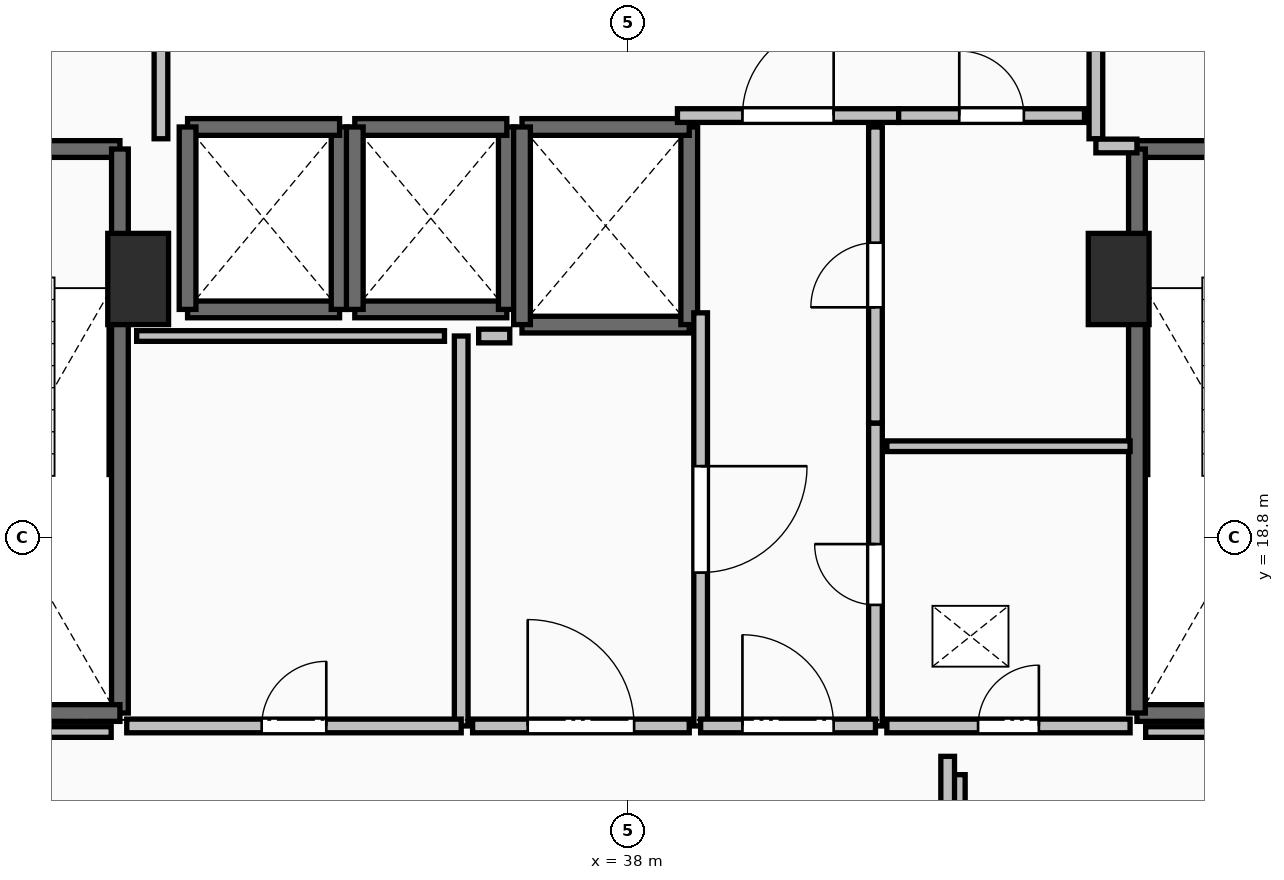
"""IFC4 building model, lengths in metres.
Left out: names, types, materials, properties, quantities, classifications, styles, units other than length and angle.
Written with IfcOpenShell. Run it as: python <this file> out.ifc"""

import sys

from ifc_helpers import new_model, si_unit, direction, frame, frame_2d, origin, origin_2d, place, context, subcontext, project, spatial, rectangle, extrude, element, fill, save


model = new_model("IFC4")
c1 = context("Model", 3, precision=1e-05, world=origin(), true_north=direction((0.0, 1.0)))
c2 = subcontext(c1, "Body", "Model", "MODEL_VIEW")
j1 = project(units=[si_unit("LENGTHUNIT", "METRE"), si_unit("PLANEANGLEUNIT", "RADIAN")], contexts=[c1])
p1 = place(None, origin())
s1 = spatial("IfcSite", under=j1, at=p1, CompositionType="ELEMENT")
p2 = place(p1, origin())
s2 = spatial("IfcBuilding", under=s1, at=p2, CompositionType="ELEMENT")
p3 = place(p2, frame((0.0, 0.0, 48.5)))
s3 = spatial("IfcBuildingStorey", under=s2, at=p3, CompositionType="ELEMENT", Elevation=48.5)
for number, where, z_axis, x_axis in (
    (1, (31.55, 22.2, 0.0), (0.0, 0.0, 1.0), (1.0, 0.0, 0.0)),
    (2, (44.45, 22.2, 0.0), (0.0, 0.0, 1.0), (1.0, 0.0, 0.0)),
):
    element("IfcColumn", number, at=place(p3, frame(where, z_axis=z_axis, x_axis=x_axis)), inside=s3, PredefinedType="PILASTER", context=c2, shape_type="SweptSolid", body=[
        extrude(rectangle(XDim=0.8, YDim=1.2, at=origin_2d()), origin(), (0.0, 0.0, 1.0), 3.5),
    ])
p4 = place(p3, frame((27.94, 23.91, 0.0), z_axis=(0.0, 0.0, 1.0), x_axis=(1.0, 0.0, 0.0)))
e3 = element("IfcWall", 3, at=p4, inside=s3, PredefinedType="SOLIDWALL", context=c2, shape_type="SweptSolid", body=[
    extrude(rectangle(XDim=3.37, YDim=0.22, at=frame_2d((1.685, 0.0))), origin(), (0.0, 0.0, 1.0), 3.24),
])
p5 = place(p4, frame((1.135, 0.0, 0.0)))
e4 = element("IfcOpeningElement", 4, at=p5, cuts=e3, PredefinedType="OPENING", context=c2, shape_type="SweptSolid", body=[
    extrude(rectangle(XDim=1.1, YDim=2.15, at=frame_2d((0.55, 1.075))), frame((0.0, 0.125, 0.0), z_axis=(0.0, -1.0, 0.0), x_axis=(1.0, 0.0, 0.0)), (0.0, 0.0, 1.0), 0.25),
])
p6 = place(p3, frame((31.31, 23.91, 0.0), z_axis=(0.0, 0.0, 1.0), x_axis=(0.0, -1.0, 0.0)))
e5 = element("IfcWall", 5, at=p6, inside=s3, PredefinedType="SOLIDWALL", context=c2, shape_type="SweptSolid", body=[
    extrude(rectangle(XDim=7.42, YDim=0.22, at=frame_2d((3.71, 0.0))), origin(), (0.0, 0.0, 1.0), 3.24),
])
p7 = place(p3, frame((31.31, 16.49, 0.0), z_axis=(0.0, 0.0, 1.0), x_axis=(-1.0, 0.0, 0.0)))
e6 = element("IfcWall", 6, at=p7, inside=s3, PredefinedType="SOLIDWALL", context=c2, shape_type="SweptSolid", body=[
    extrude(rectangle(XDim=3.37, YDim=0.22, at=frame_2d((1.685, 0.0))), origin(), (0.0, 0.0, 1.0), 3.24),
])
p8 = place(p3, frame((44.69, 23.91, 0.0), z_axis=(0.0, 0.0, 1.0), x_axis=(1.0, 0.0, 0.0)))
e7 = element("IfcWall", 7, at=p8, inside=s3, PredefinedType="SOLIDWALL", context=c2, shape_type="SweptSolid", body=[
    extrude(rectangle(XDim=3.37, YDim=0.22, at=frame_2d((1.685, 0.0))), origin(), (0.0, 0.0, 1.0), 3.24),
])
p9 = place(p8, frame((1.135, 0.0, 0.0)))
e8 = element("IfcOpeningElement", 8, at=p9, cuts=e7, PredefinedType="OPENING", context=c2, shape_type="SweptSolid", body=[
    extrude(rectangle(XDim=1.1, YDim=2.15, at=frame_2d((0.55, 1.075))), frame((0.0, 0.125, 0.0), z_axis=(0.0, -1.0, 0.0), x_axis=(1.0, 0.0, 0.0)), (0.0, 0.0, 1.0), 0.25),
])
p10 = place(p3, frame((48.06, 16.49, 0.0), z_axis=(0.0, 0.0, 1.0), x_axis=(-1.0, 0.0, 0.0)))
e9 = element("IfcWall", 9, at=p10, inside=s3, PredefinedType="SOLIDWALL", context=c2, shape_type="SweptSolid", body=[
    extrude(rectangle(XDim=3.37, YDim=0.22, at=frame_2d((1.685, 0.0))), origin(), (0.0, 0.0, 1.0), 3.24),
])
p11 = place(p3, frame((44.69, 16.49, 0.0), z_axis=(0.0, 0.0, 1.0), x_axis=(0.0, 1.0, 0.0)))
e10 = element("IfcWall", 10, at=p11, inside=s3, PredefinedType="SOLIDWALL", context=c2, shape_type="SweptSolid", body=[
    extrude(rectangle(XDim=7.42, YDim=0.22, at=frame_2d((3.71, 0.0))), origin(), (0.0, 0.0, 1.0), 3.24),
])
p12 = place(p3, frame((32.2, 21.8, 0.0), z_axis=(0.0, 0.0, 1.0), x_axis=(1.0, 0.0, 0.0)))
e11 = element("IfcWall", 11, at=p12, inside=s3, PredefinedType="SOLIDWALL", context=c2, shape_type="SweptSolid", body=[
    extrude(rectangle(XDim=2.0, YDim=0.22, at=frame_2d((1.0, 0.0))), origin(), (0.0, 0.0, 1.0), 3.24),
])
p13 = place(p3, frame((34.2, 21.8, 0.0), z_axis=(0.0, 0.0, 1.0), x_axis=(0.0, 1.0, 0.0)))
e12 = element("IfcWall", 12, at=p13, inside=s3, PredefinedType="SOLIDWALL", context=c2, shape_type="SweptSolid", body=[
    extrude(rectangle(XDim=2.4, YDim=0.22, at=frame_2d((1.2, 0.0))), origin(), (0.0, 0.0, 1.0), 3.24),
])
p14 = place(p3, frame((34.2, 24.2, 0.0), z_axis=(0.0, 0.0, 1.0), x_axis=(-1.0, 0.0, 0.0)))
e13 = element("IfcWall", 13, at=p14, inside=s3, PredefinedType="SOLIDWALL", context=c2, shape_type="SweptSolid", body=[
    extrude(rectangle(XDim=2.0, YDim=0.22, at=frame_2d((1.0, 0.0))), origin(), (0.0, 0.0, 1.0), 3.24),
])
p15 = place(p3, frame((32.2, 24.2, 0.0), z_axis=(0.0, 0.0, 1.0), x_axis=(0.0, -1.0, 0.0)))
e14 = element("IfcWall", 14, at=p15, inside=s3, PredefinedType="SOLIDWALL", context=c2, shape_type="SweptSolid", body=[
    extrude(rectangle(XDim=2.4, YDim=0.22, at=frame_2d((1.2, 0.0))), origin(), (0.0, 0.0, 1.0), 3.24),
])
p16 = place(p3, frame((34.4, 21.8, 0.0), z_axis=(0.0, 0.0, 1.0), x_axis=(1.0, 0.0, 0.0)))
e15 = element("IfcWall", 15, at=p16, inside=s3, PredefinedType="SOLIDWALL", context=c2, shape_type="SweptSolid", body=[
    extrude(rectangle(XDim=2.0, YDim=0.22, at=frame_2d((1.0, 0.0))), origin(), (0.0, 0.0, 1.0), 3.24),
])
p17 = place(p3, frame((36.4, 21.8, 0.0), z_axis=(0.0, 0.0, 1.0), x_axis=(0.0, 1.0, 0.0)))
e16 = element("IfcWall", 16, at=p17, inside=s3, PredefinedType="SOLIDWALL", context=c2, shape_type="SweptSolid", body=[
    extrude(rectangle(XDim=2.4, YDim=0.22, at=frame_2d((1.2, 0.0))), origin(), (0.0, 0.0, 1.0), 3.24),
])
p18 = place(p3, frame((36.4, 24.2, 0.0), z_axis=(0.0, 0.0, 1.0), x_axis=(-1.0, 0.0, 0.0)))
e17 = element("IfcWall", 17, at=p18, inside=s3, PredefinedType="SOLIDWALL", context=c2, shape_type="SweptSolid", body=[
    extrude(rectangle(XDim=2.0, YDim=0.22, at=frame_2d((1.0, 0.0))), origin(), (0.0, 0.0, 1.0), 3.24),
])
p19 = place(p3, frame((34.4, 24.2, 0.0), z_axis=(0.0, 0.0, 1.0), x_axis=(0.0, -1.0, 0.0)))
e18 = element("IfcWall", 18, at=p19, inside=s3, PredefinedType="SOLIDWALL", context=c2, shape_type="SweptSolid", body=[
    extrude(rectangle(XDim=2.4, YDim=0.22, at=frame_2d((1.2, 0.0))), origin(), (0.0, 0.0, 1.0), 3.24),
])
p20 = place(p3, frame((36.6, 21.6, 0.0), z_axis=(0.0, 0.0, 1.0), x_axis=(1.0, 0.0, 0.0)))
e19 = element("IfcWall", 19, at=p20, inside=s3, PredefinedType="SOLIDWALL", context=c2, shape_type="SweptSolid", body=[
    extrude(rectangle(XDim=2.2, YDim=0.22, at=frame_2d((1.1, 0.0))), origin(), (0.0, 0.0, 1.0), 3.24),
])
p21 = place(p3, frame((38.8, 21.6, 0.0), z_axis=(0.0, 0.0, 1.0), x_axis=(0.0, 1.0, 0.0)))
e20 = element("IfcWall", 20, at=p21, inside=s3, PredefinedType="SOLIDWALL", context=c2, shape_type="SweptSolid", body=[
    extrude(rectangle(XDim=2.6, YDim=0.22, at=frame_2d((1.3, 0.0))), origin(), (0.0, 0.0, 1.0), 3.24),
])
p22 = place(p3, frame((38.8, 24.2, 0.0), z_axis=(0.0, 0.0, 1.0), x_axis=(-1.0, 0.0, 0.0)))
e21 = element("IfcWall", 21, at=p22, inside=s3, PredefinedType="SOLIDWALL", context=c2, shape_type="SweptSolid", body=[
    extrude(rectangle(XDim=2.2, YDim=0.22, at=frame_2d((1.1, 0.0))), origin(), (0.0, 0.0, 1.0), 3.24),
])
p23 = place(p3, frame((36.6, 24.2, 0.0), z_axis=(0.0, 0.0, 1.0), x_axis=(0.0, -1.0, 0.0)))
e22 = element("IfcWall", 22, at=p23, inside=s3, PredefinedType="SOLIDWALL", context=c2, shape_type="SweptSolid", body=[
    extrude(rectangle(XDim=2.6, YDim=0.22, at=frame_2d((1.3, 0.0))), origin(), (0.0, 0.0, 1.0), 3.24),
])
p24 = place(p3, frame((31.85, 24.045, 0.0), z_axis=(0.0, 0.0, 1.0), x_axis=(0.0, 1.0, 0.0)))
e23 = element("IfcWall", 23, at=p24, inside=s3, PredefinedType="PARTITIONING", context=c2, shape_type="SweptSolid", body=[
    extrude(rectangle(XDim=3.91, YDim=0.18, at=frame_2d((1.955, 0.0))), origin(), (0.0, 0.0, 1.0), 3.24),
])
p25 = place(p24, frame((1.355, 0.0, 0.0)))
e24 = element("IfcOpeningElement", 24, at=p25, cuts=e23, PredefinedType="OPENING", context=c2, shape_type="SweptSolid", body=[
    extrude(rectangle(XDim=1.2, YDim=2.15, at=frame_2d((0.6, 1.075))), frame((0.0, 0.105, 0.0), z_axis=(0.0, -1.0, 0.0), x_axis=(1.0, 0.0, 0.0)), (0.0, 0.0, 1.0), 0.21),
])
p26 = place(p3, frame((44.15, 27.955, 0.0), z_axis=(0.0, 0.0, 1.0), x_axis=(0.0, -1.0, 0.0)))
e25 = element("IfcWall", 25, at=p26, inside=s3, PredefinedType="PARTITIONING", context=c2, shape_type="SweptSolid", body=[
    extrude(rectangle(XDim=3.91, YDim=0.18, at=frame_2d((1.955, 0.0))), origin(), (0.0, 0.0, 1.0), 3.24),
])
p27 = place(p26, frame((1.355, 0.0, 0.0)))
e26 = element("IfcOpeningElement", 26, at=p27, cuts=e25, PredefinedType="OPENING", context=c2, shape_type="SweptSolid", body=[
    extrude(rectangle(XDim=1.2, YDim=2.15, at=frame_2d((0.6, 1.075))), frame((0.0, 0.105, 0.0), z_axis=(0.0, -1.0, 0.0), x_axis=(1.0, 0.0, 0.0)), (0.0, 0.0, 1.0), 0.21),
])
p28 = place(p3, frame((44.15, 23.95, 0.0), z_axis=(0.0, 0.0, 1.0), x_axis=(1.0, 0.0, 0.0)))
e27 = element("IfcWall", 27, at=p28, inside=s3, PredefinedType="PARTITIONING", context=c2, shape_type="SweptSolid", body=[
    extrude(rectangle(XDim=0.54, YDim=0.18, at=frame_2d((0.27, 0.0))), origin(), (0.0, 0.0, 1.0), 3.24),
])
p29 = place(p3, frame((38.645, 24.35, 0.0), z_axis=(0.0, 0.0, 1.0), x_axis=(1.0, 0.0, 0.0)))
e28 = element("IfcWall", 28, at=p29, inside=s3, PredefinedType="PARTITIONING", context=c2, shape_type="SweptSolid", body=[
    extrude(rectangle(XDim=2.91, YDim=0.18, at=frame_2d((1.455, 0.0))), origin(), (0.0, 0.0, 1.0), 3.24),
])
p30 = place(p29, frame((0.855, 0.0, 0.0)))
e29 = element("IfcOpeningElement", 29, at=p30, cuts=e28, PredefinedType="OPENING", context=c2, shape_type="SweptSolid", body=[
    extrude(rectangle(XDim=1.2, YDim=2.15, at=frame_2d((0.6, 1.075))), frame((0.0, 0.105, 0.0), z_axis=(0.0, -1.0, 0.0), x_axis=(1.0, 0.0, 0.0)), (0.0, 0.0, 1.0), 0.21),
])
p31 = place(p3, frame((41.555, 24.35, 0.0), z_axis=(0.0, 0.0, 1.0), x_axis=(1.0, 0.0, 0.0)))
e30 = element("IfcWall", 30, at=p31, inside=s3, PredefinedType="PARTITIONING", context=c2, shape_type="SweptSolid", body=[
    extrude(rectangle(XDim=2.445, YDim=0.18, at=frame_2d((1.223, 0.0))), origin(), (0.0, 0.0, 1.0), 3.24),
])
p32 = place(p31, frame((0.798, 0.0, 0.0)))
e31 = element("IfcOpeningElement", 31, at=p32, cuts=e30, PredefinedType="OPENING", context=c2, shape_type="SweptSolid", body=[
    extrude(rectangle(XDim=0.85, YDim=2.1, at=frame_2d((0.425, 1.05))), frame((0.0, 0.105, 0.0), z_axis=(0.0, -1.0, 0.0), x_axis=(1.0, 0.0, 0.0)), (0.0, 0.0, 1.0), 0.21),
])
p33 = place(p3, frame((41.25, 16.32, 0.0), z_axis=(0.0, 0.0, 1.0), x_axis=(0.0, 1.0, 0.0)))
e32 = element("IfcWall", 32, at=p33, inside=s3, PredefinedType="PARTITIONING", context=c2, shape_type="SweptSolid", body=[
    extrude(rectangle(XDim=3.985, YDim=0.18, at=frame_2d((1.992, 0.0))), origin(), (0.0, 0.0, 1.0), 3.24),
])
p34 = place(p33, frame((1.593, 0.0, 0.0)))
e33 = element("IfcOpeningElement", 33, at=p34, cuts=e32, PredefinedType="OPENING", context=c2, shape_type="SweptSolid", body=[
    extrude(rectangle(XDim=0.8, YDim=2.05, at=frame_2d((0.4, 1.025))), frame((0.0, 0.105, 0.0), z_axis=(0.0, -1.0, 0.0), x_axis=(1.0, 0.0, 0.0)), (0.0, 0.0, 1.0), 0.21),
])
p35 = place(p3, frame((41.25, 20.305, 0.0), z_axis=(0.0, 0.0, 1.0), x_axis=(0.0, 1.0, 0.0)))
e34 = element("IfcWall", 34, at=p35, inside=s3, PredefinedType="PARTITIONING", context=c2, shape_type="SweptSolid", body=[
    extrude(rectangle(XDim=3.895, YDim=0.18, at=frame_2d((1.948, 0.0))), origin(), (0.0, 0.0, 1.0), 3.24),
])
p36 = place(p35, frame((1.522, 0.0, 0.0)))
e35 = element("IfcOpeningElement", 35, at=p36, cuts=e34, PredefinedType="OPENING", context=c2, shape_type="SweptSolid", body=[
    extrude(rectangle(XDim=0.85, YDim=2.1, at=frame_2d((0.425, 1.05))), frame((0.0, 0.105, 0.0), z_axis=(0.0, -1.0, 0.0), x_axis=(1.0, 0.0, 0.0)), (0.0, 0.0, 1.0), 0.21),
])
p37 = place(p3, frame((38.95, 21.755, 0.0), z_axis=(0.0, 0.0, 1.0), x_axis=(0.0, -1.0, 0.0)))
e36 = element("IfcWall", 36, at=p37, inside=s3, PredefinedType="PARTITIONING", context=c2, shape_type="SweptSolid", body=[
    extrude(rectangle(XDim=5.435, YDim=0.18, at=frame_2d((2.717, 0.0))), origin(), (0.0, 0.0, 1.0), 3.24),
])
p38 = place(p37, frame((2.018, 0.0, 0.0)))
e37 = element("IfcOpeningElement", 37, at=p38, cuts=e36, PredefinedType="OPENING", context=c2, shape_type="SweptSolid", body=[
    extrude(rectangle(XDim=1.4, YDim=2.2, at=frame_2d((0.7, 1.1))), frame((0.0, 0.105, 0.0), z_axis=(0.0, -1.0, 0.0), x_axis=(1.0, 0.0, 0.0)), (0.0, 0.0, 1.0), 0.21),
])
p39 = place(p3, frame((38.95, 16.32, 0.0), z_axis=(0.0, 0.0, 1.0), x_axis=(1.0, 0.0, 0.0)))
e38 = element("IfcWall", 38, at=p39, inside=s3, PredefinedType="PARTITIONING", context=c2, shape_type="SweptSolid", body=[
    extrude(rectangle(XDim=2.3, YDim=0.18, at=frame_2d((1.15, 0.0))), origin(), (0.0, 0.0, 1.0), 3.24),
])
p40 = place(p39, frame((0.55, 0.0, 0.0)))
e39 = element("IfcOpeningElement", 39, at=p40, cuts=e38, PredefinedType="OPENING", context=c2, shape_type="SweptSolid", body=[
    extrude(rectangle(XDim=1.2, YDim=2.15, at=frame_2d((0.6, 1.075))), frame((0.0, 0.105, 0.0), z_axis=(0.0, -1.0, 0.0), x_axis=(1.0, 0.0, 0.0)), (0.0, 0.0, 1.0), 0.21),
])
p41 = place(p3, frame((44.6, 20.0, 0.0), z_axis=(0.0, 0.0, 1.0), x_axis=(-1.0, 0.0, 0.0)))
e40 = element("IfcWall", 40, at=p41, inside=s3, PredefinedType="PARTITIONING", context=c2, shape_type="SweptSolid", body=[
    extrude(rectangle(XDim=3.2, YDim=0.14, at=frame_2d((1.6, 0.0))), origin(), (0.0, 0.0, 1.0), 3.24),
])
p42 = place(p3, frame((41.4, 16.32, 0.0), z_axis=(0.0, 0.0, 1.0), x_axis=(1.0, 0.0, 0.0)))
e41 = element("IfcWall", 41, at=p42, inside=s3, PredefinedType="PARTITIONING", context=c2, shape_type="SweptSolid", body=[
    extrude(rectangle(XDim=3.2, YDim=0.18, at=frame_2d((1.6, 0.0))), origin(), (0.0, 0.0, 1.0), 3.24),
])
p43 = place(p42, frame((1.2, 0.0, 0.0)))
e42 = element("IfcOpeningElement", 42, at=p43, cuts=e41, PredefinedType="OPENING", context=c2, shape_type="SweptSolid", body=[
    extrude(rectangle(XDim=0.8, YDim=2.05, at=frame_2d((0.4, 1.025))), frame((0.0, 0.105, 0.0), z_axis=(0.0, -1.0, 0.0), x_axis=(1.0, 0.0, 0.0)), (0.0, 0.0, 1.0), 0.21),
])
p44 = place(p3, frame((35.8, 16.32, 0.0), z_axis=(0.0, 0.0, 1.0), x_axis=(0.0, 1.0, 0.0)))
e43 = element("IfcWall", 43, at=p44, inside=s3, PredefinedType="PARTITIONING", context=c2, shape_type="SweptSolid", body=[
    extrude(rectangle(XDim=5.13, YDim=0.18, at=frame_2d((2.565, 0.0))), origin(), (0.0, 0.0, 1.0), 3.24),
])
p45 = place(p3, frame((31.4, 16.32, 0.0), z_axis=(0.0, 0.0, 1.0), x_axis=(1.0, 0.0, 0.0)))
e44 = element("IfcWall", 44, at=p45, inside=s3, PredefinedType="PARTITIONING", context=c2, shape_type="SweptSolid", body=[
    extrude(rectangle(XDim=4.4, YDim=0.18, at=frame_2d((2.2, 0.0))), origin(), (0.0, 0.0, 1.0), 3.24),
])
p46 = place(p45, frame((1.775, 0.0, 0.0)))
e45 = element("IfcOpeningElement", 45, at=p46, cuts=e44, PredefinedType="OPENING", context=c2, shape_type="SweptSolid", body=[
    extrude(rectangle(XDim=0.85, YDim=2.1, at=frame_2d((0.425, 1.05))), frame((0.0, 0.105, 0.0), z_axis=(0.0, -1.0, 0.0), x_axis=(1.0, 0.0, 0.0)), (0.0, 0.0, 1.0), 0.21),
])
p47 = place(p3, frame((35.95, 16.32, 0.0), z_axis=(0.0, 0.0, 1.0), x_axis=(1.0, 0.0, 0.0)))
e46 = element("IfcWall", 46, at=p47, inside=s3, PredefinedType="PARTITIONING", context=c2, shape_type="SweptSolid", body=[
    extrude(rectangle(XDim=2.85, YDim=0.18, at=frame_2d((1.425, 0.0))), origin(), (0.0, 0.0, 1.0), 3.24),
])
p48 = place(p47, frame((0.725, 0.0, 0.0)))
e47 = element("IfcOpeningElement", 47, at=p48, cuts=e46, PredefinedType="OPENING", context=c2, shape_type="SweptSolid", body=[
    extrude(rectangle(XDim=1.4, YDim=2.2, at=frame_2d((0.7, 1.1))), frame((0.0, 0.105, 0.0), z_axis=(0.0, -1.0, 0.0), x_axis=(1.0, 0.0, 0.0)), (0.0, 0.0, 1.0), 0.21),
])
p49 = place(p3, frame((42.34, 15.679, 0.0), z_axis=(0.0, 0.0, 1.0), x_axis=(0.0, -1.0, 0.0)))
e48 = element("IfcWall", 48, at=p49, inside=s3, PredefinedType="PARTITIONING", context=c2, shape_type="SweptSolid", body=[
    extrude(rectangle(XDim=1.579, YDim=0.18, at=frame_2d((0.79, 0.0))), origin(), (0.0, 0.0, 1.0), 3.24),
])
p50 = place(p3, frame((42.2, 14.1, 0.0), z_axis=(0.0, 0.0, 1.0), x_axis=(0.0, 1.0, 0.0)))
e49 = element("IfcWall", 49, at=p50, inside=s3, PredefinedType="PARTITIONING", context=c2, shape_type="SweptSolid", body=[
    extrude(rectangle(XDim=1.82, YDim=0.18, at=frame_2d((0.91, 0.0))), origin(), (0.0, 0.0, 1.0), 3.24),
])
p51 = place(p3, frame((35.58, 21.45, 0.0), z_axis=(0.0, 0.0, 1.0), x_axis=(-1.0, 0.0, 0.0)))
e50 = element("IfcWall", 50, at=p51, inside=s3, PredefinedType="PARTITIONING", context=c2, shape_type="SweptSolid", body=[
    extrude(rectangle(XDim=4.05, YDim=0.14, at=frame_2d((2.025, 0.0))), origin(), (0.0, 0.0, 1.0), 3.24),
])
p52 = place(p3, frame((36.439, 21.45, 0.0), z_axis=(0.0, 0.0, 1.0), x_axis=(-1.0, 0.0, 0.0)))
e51 = element("IfcWall", 51, at=p52, inside=s3, PredefinedType="PARTITIONING", context=c2, shape_type="SweptSolid", body=[
    extrude(rectangle(XDim=0.409, YDim=0.18, at=frame_2d((0.205, 0.0))), origin(), (0.0, 0.0, 1.0), 3.24),
])
for number, where, z_axis, x_axis in (
    (52, (48.55, 16.24, 0.0), (0.0, 0.0, 1.0), (-1.0, 0.0, 0.0)),
    (53, (31.195, 16.24, 0.0), (0.0, 0.0, 1.0), (-1.0, 0.0, 0.0)),
):
    element("IfcWall", number, at=place(p3, frame(where, z_axis=z_axis, x_axis=x_axis)), inside=s3, PredefinedType="PARTITIONING", context=c2, shape_type="SweptSolid", body=[
        extrude(rectangle(XDim=3.745, YDim=0.14, at=frame_2d((1.873, 0.0))), origin(), (0.0, 0.0, 1.0), 2.432),
    ])
p53 = place(p30, origin())
e54 = element("IfcDoor", 54, at=p53, inside=s3, OperationType="SINGLE_SWING_RIGHT", PredefinedType="DOOR", context=c2, shape_type="SweptSolid", body=[
    extrude(rectangle(XDim=1.2, YDim=2.15, at=frame_2d((0.6, 1.075))), frame((0.0, 0.025, 0.0), z_axis=(0.0, -1.0, 0.0), x_axis=(1.0, 0.0, 0.0)), (0.0, 0.0, 1.0), 0.05),
])
fill(e29, e54)
p54 = place(p32, origin())
e55 = element("IfcDoor", 55, at=p54, inside=s3, OperationType="SINGLE_SWING_LEFT", PredefinedType="DOOR", context=c2, shape_type="SweptSolid", body=[
    extrude(rectangle(XDim=0.85, YDim=2.1, at=frame_2d((0.425, 1.05))), frame((0.0, 0.025, 0.0), z_axis=(0.0, -1.0, 0.0), x_axis=(1.0, 0.0, 0.0)), (0.0, 0.0, 1.0), 0.05),
])
fill(e31, e55)
p55 = place(p34, origin())
e56 = element("IfcDoor", 56, at=p55, inside=s3, OperationType="SINGLE_SWING_RIGHT", PredefinedType="DOOR", context=c2, shape_type="SweptSolid", body=[
    extrude(rectangle(XDim=0.8, YDim=2.05, at=frame_2d((0.4, 1.025))), frame((0.0, 0.025, 0.0), z_axis=(0.0, -1.0, 0.0), x_axis=(1.0, 0.0, 0.0)), (0.0, 0.0, 1.0), 0.05),
])
fill(e33, e56)
p56 = place(p36, origin())
e57 = element("IfcDoor", 57, at=p56, inside=s3, OperationType="SINGLE_SWING_LEFT", PredefinedType="DOOR", context=c2, shape_type="SweptSolid", body=[
    extrude(rectangle(XDim=0.85, YDim=2.1, at=frame_2d((0.425, 1.05))), frame((0.0, 0.025, 0.0), z_axis=(0.0, -1.0, 0.0), x_axis=(1.0, 0.0, 0.0)), (0.0, 0.0, 1.0), 0.05),
])
fill(e35, e57)
p57 = place(p38, origin())
e58 = element("IfcDoor", 58, at=p57, inside=s3, OperationType="DOUBLE_SWING_LEFT", PredefinedType="DOOR", context=c2, shape_type="SweptSolid", body=[
    extrude(rectangle(XDim=1.4, YDim=2.2, at=frame_2d((0.7, 1.1))), frame((0.0, 0.025, 0.0), z_axis=(0.0, -1.0, 0.0), x_axis=(1.0, 0.0, 0.0)), (0.0, 0.0, 1.0), 0.05),
])
fill(e37, e58)
p58 = place(p40, origin())
e59 = element("IfcDoor", 59, at=p58, inside=s3, OperationType="SINGLE_SWING_LEFT", PredefinedType="DOOR", context=c2, shape_type="SweptSolid", body=[
    extrude(rectangle(XDim=1.2, YDim=2.15, at=frame_2d((0.6, 1.075))), frame((0.0, 0.025, 0.0), z_axis=(0.0, -1.0, 0.0), x_axis=(1.0, 0.0, 0.0)), (0.0, 0.0, 1.0), 0.05),
])
fill(e39, e59)
p59 = place(p43, origin())
e60 = element("IfcDoor", 60, at=p59, inside=s3, OperationType="SINGLE_SWING_RIGHT", PredefinedType="DOOR", context=c2, shape_type="SweptSolid", body=[
    extrude(rectangle(XDim=0.8, YDim=2.05, at=frame_2d((0.4, 1.025))), frame((0.0, 0.025, 0.0), z_axis=(0.0, -1.0, 0.0), x_axis=(1.0, 0.0, 0.0)), (0.0, 0.0, 1.0), 0.05),
])
fill(e42, e60)
p60 = place(p46, origin())
e61 = element("IfcDoor", 61, at=p60, inside=s3, OperationType="SINGLE_SWING_RIGHT", PredefinedType="DOOR", context=c2, shape_type="SweptSolid", body=[
    extrude(rectangle(XDim=0.85, YDim=2.1, at=frame_2d((0.425, 1.05))), frame((0.0, 0.025, 0.0), z_axis=(0.0, -1.0, 0.0), x_axis=(1.0, 0.0, 0.0)), (0.0, 0.0, 1.0), 0.05),
])
fill(e45, e61)
p61 = place(p48, origin())
e62 = element("IfcDoor", 62, at=p61, inside=s3, OperationType="DOUBLE_SWING_LEFT", PredefinedType="DOOR", context=c2, shape_type="SweptSolid", body=[
    extrude(rectangle(XDim=1.4, YDim=2.2, at=frame_2d((0.7, 1.1))), frame((0.0, 0.025, 0.0), z_axis=(0.0, -1.0, 0.0), x_axis=(1.0, 0.0, 0.0)), (0.0, 0.0, 1.0), 0.05),
])
fill(e47, e62)
save(model, sys.argv[1])
